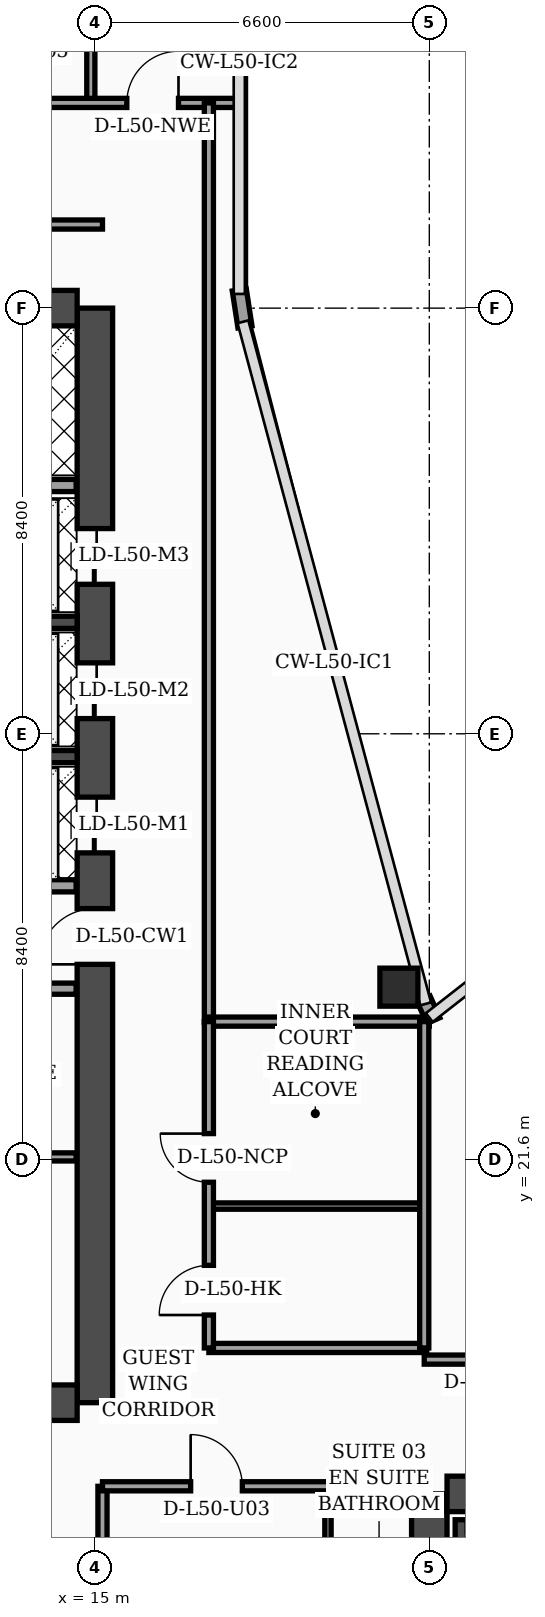
"""IFC4 building model, lengths in metres.
Left out: names, types, materials, properties, quantities, classifications, styles, units other than length and angle.
Written with IfcOpenShell. Run it as: python <this file> out.ifc"""

import sys

from ifc_helpers import new_model, si_unit, direction, frame, frame_2d, origin, origin_2d, place, context, subcontext, project, spatial, rectangle, hollow_rectangle, extrude, element, fill, save


model = new_model("IFC4")
c1 = context("Model", 3, precision=1e-05, world=origin(), true_north=direction((0.0, 1.0)))
c2 = subcontext(c1, "Body", "Model", "MODEL_VIEW")
j1 = project(units=[si_unit("LENGTHUNIT", "METRE"), si_unit("PLANEANGLEUNIT", "RADIAN")], contexts=[c1])
p1 = place(None, origin())
s1 = spatial("IfcSite", under=j1, at=p1, CompositionType="ELEMENT")
p2 = place(p1, origin())
s2 = spatial("IfcBuilding", under=s1, at=p2, CompositionType="ELEMENT")
p3 = place(p2, frame((0.0, 0.0, 203.4)))
s3 = spatial("IfcBuildingStorey", under=s2, at=p3, CompositionType="ELEMENT", Elevation=203.4)
p4 = place(p3, frame((15.0, 16.8, 0.0), z_axis=(0.0, 0.0, 1.0), x_axis=(0.0, 1.0, 0.0)))
e1 = element("IfcWall", 1, at=p4, inside=s3, PredefinedType="SHEAR", context=c2, shape_type="SweptSolid", body=[
    extrude(rectangle(XDim=21.6, YDim=0.7, at=frame_2d((10.8, 0.0))), origin(), (0.0, 0.0, 1.0), 3.56),
])
p5 = place(p4, frame((8.65, 0.0, 0.0)))
e2 = element("IfcOpeningElement", 2, at=p5, cuts=e1, PredefinedType="OPENING", context=c2, shape_type="SweptSolid", body=[
    extrude(rectangle(XDim=1.1, YDim=2.2, at=frame_2d((0.55, 1.1))), frame((0.0, 0.36, 0.0), z_axis=(0.0, -1.0, 0.0), x_axis=(1.0, 0.0, 0.0)), (0.0, 0.0, 1.0), 0.72),
])
p6 = place(p4, frame((10.85, 0.0, 0.0)))
e3 = element("IfcOpeningElement", 3, at=p6, cuts=e1, PredefinedType="OPENING", context=c2, shape_type="SweptSolid", body=[
    extrude(rectangle(XDim=1.1, YDim=2.2, at=frame_2d((0.55, 1.1))), frame((0.0, 0.36, 0.0), z_axis=(0.0, -1.0, 0.0), x_axis=(1.0, 0.0, 0.0)), (0.0, 0.0, 1.0), 0.72),
])
p7 = place(p4, frame((13.5, 0.0, 0.0)))
e4 = element("IfcOpeningElement", 4, at=p7, cuts=e1, PredefinedType="OPENING", context=c2, shape_type="SweptSolid", body=[
    extrude(rectangle(XDim=1.1, YDim=2.2, at=frame_2d((0.55, 1.1))), frame((0.0, 0.36, 0.0), z_axis=(0.0, -1.0, 0.0), x_axis=(1.0, 0.0, 0.0)), (0.0, 0.0, 1.0), 0.72),
])
p8 = place(p4, frame((16.15, 0.0, 0.0)))
e5 = element("IfcOpeningElement", 5, at=p8, cuts=e1, PredefinedType="OPENING", context=c2, shape_type="SweptSolid", body=[
    extrude(rectangle(XDim=1.1, YDim=2.2, at=frame_2d((0.55, 1.1))), frame((0.0, 0.36, 0.0), z_axis=(0.0, -1.0, 0.0), x_axis=(1.0, 0.0, 0.0)), (0.0, 0.0, 1.0), 0.72),
])
for number, where, z_axis, x_axis in (
    (6, (4.55, 38.4, 0.0), (0.0, 0.0, 1.0), (1.0, 0.0, 0.0)),
    (7, (4.55, 16.8, 0.0), (0.0, 0.0, 1.0), (1.0, 0.0, 0.0)),
):
    element("IfcWall", number, at=place(p3, frame(where, z_axis=z_axis, x_axis=x_axis)), inside=s3, PredefinedType="SHEAR", context=c2, shape_type="SweptSolid", body=[
        extrude(rectangle(XDim=10.1, YDim=0.7, at=frame_2d((5.05, 0.0))), origin(), (0.0, 0.0, 1.0), 3.56),
    ])
p9 = place(p3, frame((21.6, 4.6, 0.0), z_axis=(0.0, 0.0, 1.0), x_axis=(0.0, 1.0, 0.0)))
e8 = element("IfcWall", 8, at=p9, inside=s3, PredefinedType="SHEAR", context=c2, shape_type="SweptSolid", body=[
    extrude(rectangle(XDim=10.4, YDim=0.7, at=frame_2d((5.2, 0.0))), origin(), (0.0, 0.0, 1.0), 3.56),
])
p10 = place(p3, frame((21.95, 15.0, 0.0), z_axis=(0.0, 0.0, 1.0), x_axis=(1.0, 0.0, 0.0)))
e9 = element("IfcWall", 9, at=p10, inside=s3, PredefinedType="SHEAR", context=c2, shape_type="SweptSolid", body=[
    extrude(rectangle(XDim=10.1, YDim=0.7, at=frame_2d((5.05, 0.0))), origin(), (0.0, 0.0, 1.0), 3.56),
])
p11 = place(p10, frame((4.95, 0.0, 0.0)))
e10 = element("IfcOpeningElement", 10, at=p11, cuts=e9, PredefinedType="OPENING", context=c2, shape_type="SweptSolid", body=[
    extrude(rectangle(XDim=1.1, YDim=2.2, at=frame_2d((0.55, 1.1))), frame((0.0, 0.36, 0.0), z_axis=(0.0, -1.0, 0.0), x_axis=(1.0, 0.0, 0.0)), (0.0, 0.0, 1.0), 0.72),
])
p12 = place(p3, frame((22.23, 4.95, 0.0), z_axis=(0.0, 0.0, 1.0), x_axis=(0.0, 1.0, 0.0)))
e11 = element("IfcWall", 11, at=p12, inside=s3, PredefinedType="SOLIDWALL", context=c2, shape_type="SweptSolid", body=[
    extrude(rectangle(XDim=9.54, YDim=0.24, at=frame_2d((4.77, 0.0))), origin(), (0.0, 0.0, 1.0), 3.56),
])
for number, where, z_axis, x_axis in (
    (12, (12.18, 29.55, 0.0), (0.0, 0.0, 1.0), (1.0, 0.0, 0.0)),
    (13, (12.18, 32.2, 0.0), (0.0, 0.0, 1.0), (1.0, 0.0, 0.0)),
):
    element("IfcWall", number, at=place(p3, frame(where, z_axis=z_axis, x_axis=x_axis)), inside=s3, PredefinedType="SOLIDWALL", context=c2, shape_type="SweptSolid", body=[
        extrude(rectangle(XDim=2.47, YDim=0.24, at=frame_2d((1.235, 0.0))), origin(), (0.0, 0.0, 1.0), 3.56),
    ])
p13 = place(p3, frame((21.0, 25.0, 0.0), z_axis=(0.0, 0.0, 1.0), x_axis=(1.0, 0.0, 0.0)))
e14 = element("IfcColumn", 14, at=p13, inside=s3, PredefinedType="COLUMN", context=c2, shape_type="SweptSolid", body=[
    extrude(hollow_rectangle(XDim=0.75, YDim=0.75, WallThickness=0.032, at=origin_2d()), origin(), (0.0, 0.0, 1.0), 3.56),
])
p14 = place(p3, frame((21.68, 24.34, 0.0), z_axis=(0.0, 0.0, 1.0), x_axis=(-0.40758134973, 0.913168901875, 0.0)))
e15 = element("IfcWall", 15, at=p14, inside=s3, PredefinedType="SOLIDWALL", context=c2, shape_type="SweptSolid", body=[
    extrude(rectangle(XDim=0.471, YDim=0.28, at=frame_2d((0.235, 0.0))), origin(), (0.0, 0.0, 1.0), 3.56),
])
p15 = place(p3, frame((17.962, 38.03, 0.0), z_axis=(0.0, 0.0, 1.0), x_axis=(-0.15141125477, 0.988470855377, 0.0)))
e16 = element("IfcWall", 16, at=p15, inside=s3, PredefinedType="SOLIDWALL", context=c2, shape_type="SweptSolid", body=[
    extrude(rectangle(XDim=0.739, YDim=0.28, at=frame_2d((0.369, 0.0))), origin(), (0.0, 0.0, 1.0), 3.56),
])
p16 = place(p3, frame((9.68, 21.65, 0.0), z_axis=(0.0, 0.0, 1.0), x_axis=(1.0, 0.0, 0.0)))
e17 = element("IfcWall", 17, at=p16, inside=s3, PredefinedType="PARTITIONING", context=c2, shape_type="SweptSolid", body=[
    extrude(rectangle(XDim=4.95, YDim=0.16, at=frame_2d((2.475, 0.0))), origin(), (0.0, 0.0, 1.0), 3.09),
])
p17 = place(p16, frame((1.1, 0.0, 0.0)))
e18 = element("IfcOpeningElement", 18, at=p17, cuts=e17, PredefinedType="OPENING", context=c2, shape_type="SweptSolid", body=[
    extrude(rectangle(XDim=0.98, YDim=2.15, at=frame_2d((0.49, 1.075))), frame((0.0, 0.09, 0.0), z_axis=(0.0, -1.0, 0.0), x_axis=(1.0, 0.0, 0.0)), (0.0, 0.0, 1.0), 0.18),
])
p18 = place(p3, frame((9.68, 24.97, 0.0), z_axis=(0.0, 0.0, 1.0), x_axis=(1.0, 0.0, 0.0)))
e19 = element("IfcWall", 19, at=p18, inside=s3, PredefinedType="SOLIDWALL", context=c2, shape_type="SweptSolid", body=[
    extrude(rectangle(XDim=4.95, YDim=0.22, at=frame_2d((2.475, 0.0))), origin(), (0.0, 0.0, 1.0), 2.94),
])
p19 = place(p18, frame((0.9, 0.0, 0.0)))
e20 = element("IfcOpeningElement", 20, at=p19, cuts=e19, PredefinedType="OPENING", context=c2, shape_type="SweptSolid", body=[
    extrude(rectangle(XDim=0.98, YDim=2.15, at=frame_2d((0.49, 1.075))), frame((0.0, 0.12, 0.0), z_axis=(0.0, -1.0, 0.0), x_axis=(1.0, 0.0, 0.0)), (0.0, 0.0, 1.0), 0.24),
])
p20 = place(p3, frame((12.25, 27.0, 0.0), z_axis=(0.0, 0.0, 1.0), x_axis=(1.0, 0.0, 0.0)))
e21 = element("IfcWall", 21, at=p20, inside=s3, PredefinedType="SOLIDWALL", context=c2, shape_type="SweptSolid", body=[
    extrude(rectangle(XDim=2.38, YDim=0.24, at=frame_2d((1.19, 0.0))), origin(), (0.0, 0.0, 1.0), 3.56),
])
p21 = place(p3, frame((9.66, 34.9, 0.0), z_axis=(0.0, 0.0, 1.0), x_axis=(1.0, 0.0, 0.0)))
e22 = element("IfcWall", 22, at=p21, inside=s3, PredefinedType="SOLIDWALL", context=c2, shape_type="SweptSolid", body=[
    extrude(rectangle(XDim=4.97, YDim=0.24, at=frame_2d((2.485, 0.0))), origin(), (0.0, 0.0, 1.0), 3.56),
])
p22 = place(p3, frame((15.15, 2.44, 0.0), z_axis=(0.0, 0.0, 1.0), x_axis=(0.0, 1.0, 0.0)))
e23 = element("IfcWall", 23, at=p22, inside=s3, PredefinedType="PARTITIONING", context=c2, shape_type="SweptSolid", body=[
    extrude(rectangle(XDim=12.71, YDim=0.18, at=frame_2d((6.355, 0.0))), origin(), (0.0, 0.0, 1.0), 3.09),
])
p23 = place(p3, frame((19.6, 2.44, 0.0), z_axis=(0.0, 0.0, 1.0), x_axis=(0.0, 1.0, 0.0)))
e24 = element("IfcWall", 24, at=p23, inside=s3, PredefinedType="PARTITIONING", context=c2, shape_type="SweptSolid", body=[
    extrude(rectangle(XDim=12.71, YDim=0.125, at=frame_2d((6.355, 0.0))), origin(), (0.0, 0.0, 1.0), 2.59),
])
p24 = place(p23, frame((4.34, 0.0, 0.0)))
e25 = element("IfcOpeningElement", 25, at=p24, cuts=e24, PredefinedType="OPENING", context=c2, shape_type="SweptSolid", body=[
    extrude(rectangle(XDim=0.96, YDim=2.2, at=frame_2d((0.48, 1.1))), frame((0.0, 0.073, 0.0), z_axis=(0.0, -1.0, 0.0), x_axis=(1.0, 0.0, 0.0)), (0.0, 0.0, 1.0), 0.145),
])
p25 = place(p23, frame((10.18, 0.0, 0.0)))
e26 = element("IfcOpeningElement", 26, at=p25, cuts=e24, PredefinedType="OPENING", context=c2, shape_type="SweptSolid", body=[
    extrude(rectangle(XDim=0.9, YDim=2.15, at=frame_2d((0.45, 1.075))), frame((0.0, 0.073, 0.0), z_axis=(0.0, -1.0, 0.0), x_axis=(1.0, 0.0, 0.0)), (0.0, 0.0, 1.0), 0.145),
])
p26 = place(p3, frame((15.15, 15.15, 0.0), z_axis=(0.0, 0.0, 1.0), x_axis=(1.0, 0.0, 0.0)))
e27 = element("IfcWall", 27, at=p26, inside=s3, PredefinedType="PARTITIONING", context=c2, shape_type="SweptSolid", body=[
    extrude(rectangle(XDim=6.45, YDim=0.18, at=frame_2d((3.225, 0.0))), origin(), (0.0, 0.0, 1.0), 2.59),
])
p27 = place(p26, frame((1.74, 0.0, 0.0)))
e28 = element("IfcOpeningElement", 28, at=p27, cuts=e27, PredefinedType="OPENING", context=c2, shape_type="SweptSolid", body=[
    extrude(rectangle(XDim=1.02, YDim=2.2, at=frame_2d((0.51, 1.1))), frame((0.0, 0.1, 0.0), z_axis=(0.0, -1.0, 0.0), x_axis=(1.0, 0.0, 0.0)), (0.0, 0.0, 1.0), 0.2),
])
p28 = place(p3, frame((14.92, 42.45, 0.0), z_axis=(0.0, 0.0, 1.0), x_axis=(0.0, 1.0, 0.0)))
e29 = element("IfcWall", 29, at=p28, inside=s3, PredefinedType="PARTITIONING", context=c2, shape_type="SweptSolid", body=[
    extrude(rectangle(XDim=5.35, YDim=0.16, at=frame_2d((2.675, 0.0))), origin(), (0.0, 0.0, 1.0), 3.09),
])
p29 = place(p3, frame((0.08, 42.45, 0.0), z_axis=(0.0, 0.0, 1.0), x_axis=(1.0, 0.0, 0.0)))
e30 = element("IfcWall", 30, at=p29, inside=s3, PredefinedType="PARTITIONING", context=c2, shape_type="SweptSolid", body=[
    extrude(rectangle(XDim=17.77, YDim=0.18, at=frame_2d((8.885, 0.0))), origin(), (0.0, 0.0, 1.0), 2.94),
])
p30 = place(p29, frame((0.9, 0.0, 0.0)))
e31 = element("IfcOpeningElement", 31, at=p30, cuts=e30, PredefinedType="OPENING", context=c2, shape_type="SweptSolid", body=[
    extrude(rectangle(XDim=1.02, YDim=2.2, at=frame_2d((0.51, 1.1))), frame((0.0, 0.1, 0.0), z_axis=(0.0, -1.0, 0.0), x_axis=(1.0, 0.0, 0.0)), (0.0, 0.0, 1.0), 0.2),
])
p31 = place(p29, frame((4.2, 0.0, 0.0)))
e32 = element("IfcOpeningElement", 32, at=p31, cuts=e30, PredefinedType="OPENING", context=c2, shape_type="SweptSolid", body=[
    extrude(rectangle(XDim=1.02, YDim=2.2, at=frame_2d((0.51, 1.1))), frame((0.0, 0.1, 0.0), z_axis=(0.0, -1.0, 0.0), x_axis=(1.0, 0.0, 0.0)), (0.0, 0.0, 1.0), 0.2),
])
p32 = place(p29, frame((10.08, 0.0, 0.0)))
e33 = element("IfcOpeningElement", 33, at=p32, cuts=e30, PredefinedType="OPENING", context=c2, shape_type="SweptSolid", body=[
    extrude(rectangle(XDim=1.02, YDim=2.2, at=frame_2d((0.51, 1.1))), frame((0.0, 0.1, 0.0), z_axis=(0.0, -1.0, 0.0), x_axis=(1.0, 0.0, 0.0)), (0.0, 0.0, 1.0), 0.2),
])
p33 = place(p29, frame((15.55, 0.0, 0.0)))
e34 = element("IfcOpeningElement", 34, at=p33, cuts=e30, PredefinedType="OPENING", context=c2, shape_type="SweptSolid", body=[
    extrude(rectangle(XDim=1.02, YDim=2.2, at=frame_2d((0.51, 1.1))), frame((0.0, 0.1, 0.0), z_axis=(0.0, -1.0, 0.0), x_axis=(1.0, 0.0, 0.0)), (0.0, 0.0, 1.0), 0.2),
])
p34 = place(p3, frame((17.25, 24.3, 0.0), z_axis=(0.0, 0.0, 1.0), x_axis=(0.0, 1.0, 0.0)))
e35 = element("IfcWall", 35, at=p34, inside=s3, PredefinedType="PARTITIONING", context=c2, shape_type="SweptSolid", body=[
    extrude(rectangle(XDim=18.15, YDim=0.18, at=frame_2d((9.075, 0.0))), origin(), (0.0, 0.0, 1.0), 2.94),
])
p35 = place(p3, frame((3.83, 40.05, 0.0), z_axis=(0.0, 0.0, 1.0), x_axis=(1.0, 0.0, 0.0)))
e36 = element("IfcWall", 36, at=p35, inside=s3, PredefinedType="PARTITIONING", context=c2, shape_type="SweptSolid", body=[
    extrude(rectangle(XDim=11.32, YDim=0.18, at=frame_2d((5.66, 0.0))), origin(), (0.0, 0.0, 1.0), 2.94),
])
p36 = place(p3, frame((17.25, 17.88, 0.0), z_axis=(0.0, 0.0, 1.0), x_axis=(1.0, 0.0, 0.0)))
e37 = element("IfcWall", 37, at=p36, inside=s3, PredefinedType="PARTITIONING", context=c2, shape_type="SweptSolid", body=[
    extrude(rectangle(XDim=4.3, YDim=0.18, at=frame_2d((2.15, 0.0))), origin(), (0.0, 0.0, 1.0), 3.56),
])
p37 = place(p3, frame((17.25, 20.68, 0.0), z_axis=(0.0, 0.0, 1.0), x_axis=(1.0, 0.0, 0.0)))
e38 = element("IfcWall", 38, at=p37, inside=s3, PredefinedType="PARTITIONING", context=c2, shape_type="SweptSolid", body=[
    extrude(rectangle(XDim=4.3, YDim=0.125, at=frame_2d((2.15, 0.0))), origin(), (0.0, 0.0, 1.0), 3.56),
])
p38 = place(p3, frame((17.25, 24.32, 0.0), z_axis=(0.0, 0.0, 1.0), x_axis=(1.0, 0.0, 0.0)))
e39 = element("IfcWall", 39, at=p38, inside=s3, PredefinedType="PARTITIONING", context=c2, shape_type="SweptSolid", body=[
    extrude(rectangle(XDim=4.35, YDim=0.18, at=frame_2d((2.175, 0.0))), origin(), (0.0, 0.0, 1.0), 3.56),
])
p39 = place(p3, frame((21.5, 17.88, 0.0), z_axis=(0.0, 0.0, 1.0), x_axis=(0.0, 1.0, 0.0)))
e40 = element("IfcWall", 40, at=p39, inside=s3, PredefinedType="PARTITIONING", context=c2, shape_type="SweptSolid", body=[
    extrude(rectangle(XDim=6.44, YDim=0.18, at=frame_2d((3.22, 0.0))), origin(), (0.0, 0.0, 1.0), 3.09),
])
p40 = place(p3, frame((17.25, 17.88, 0.0), z_axis=(0.0, 0.0, 1.0), x_axis=(0.0, 1.0, 0.0)))
e41 = element("IfcWall", 41, at=p40, inside=s3, PredefinedType="PARTITIONING", context=c2, shape_type="SweptSolid", body=[
    extrude(rectangle(XDim=6.44, YDim=0.18, at=frame_2d((3.22, 0.0))), origin(), (0.0, 0.0, 1.0), 3.09),
])
p41 = place(p40, frame((0.65, 0.0, 0.0)))
e42 = element("IfcOpeningElement", 42, at=p41, cuts=e41, PredefinedType="OPENING", context=c2, shape_type="SweptSolid", body=[
    extrude(rectangle(XDim=0.98, YDim=2.15, at=frame_2d((0.49, 1.075))), frame((0.0, 0.1, 0.0), z_axis=(0.0, -1.0, 0.0), x_axis=(1.0, 0.0, 0.0)), (0.0, 0.0, 1.0), 0.2),
])
p42 = place(p40, frame((3.27, 0.0, 0.0)))
e43 = element("IfcOpeningElement", 43, at=p42, cuts=e41, PredefinedType="OPENING", context=c2, shape_type="SweptSolid", body=[
    extrude(rectangle(XDim=0.96, YDim=2.2, at=frame_2d((0.48, 1.1))), frame((0.0, 0.1, 0.0), z_axis=(0.0, -1.0, 0.0), x_axis=(1.0, 0.0, 0.0)), (0.0, 0.0, 1.0), 0.2),
])
p43 = place(p3, frame((21.5, 17.65, 0.0), z_axis=(0.0, 0.0, 1.0), x_axis=(1.0, 0.0, 0.0)))
e44 = element("IfcWall", 44, at=p43, inside=s3, PredefinedType="PARTITIONING", context=c2, shape_type="SweptSolid", body=[
    extrude(rectangle(XDim=17.25, YDim=0.18, at=frame_2d((8.625, 0.0))), origin(), (0.0, 0.0, 1.0), 2.94),
])
p44 = place(p43, frame((0.95, 0.0, 0.0)))
e45 = element("IfcOpeningElement", 45, at=p44, cuts=e44, PredefinedType="OPENING", context=c2, shape_type="SweptSolid", body=[
    extrude(rectangle(XDim=1.02, YDim=2.2, at=frame_2d((0.51, 1.1))), frame((0.0, 0.1, 0.0), z_axis=(0.0, -1.0, 0.0), x_axis=(1.0, 0.0, 0.0)), (0.0, 0.0, 1.0), 0.2),
])
p45 = place(p43, frame((6.67, 0.0, 0.0)))
e46 = element("IfcOpeningElement", 46, at=p45, cuts=e44, PredefinedType="OPENING", context=c2, shape_type="SweptSolid", body=[
    extrude(rectangle(XDim=1.02, YDim=2.2, at=frame_2d((0.51, 1.1))), frame((0.0, 0.1, 0.0), z_axis=(0.0, -1.0, 0.0), x_axis=(1.0, 0.0, 0.0)), (0.0, 0.0, 1.0), 0.2),
])
p46 = place(p43, frame((12.38, 0.0, 0.0)))
e47 = element("IfcOpeningElement", 47, at=p46, cuts=e44, PredefinedType="OPENING", context=c2, shape_type="SweptSolid", body=[
    extrude(rectangle(XDim=1.02, YDim=2.2, at=frame_2d((0.51, 1.1))), frame((0.0, 0.1, 0.0), z_axis=(0.0, -1.0, 0.0), x_axis=(1.0, 0.0, 0.0)), (0.0, 0.0, 1.0), 0.2),
])
p47 = place(p27, origin())
e48 = element("IfcDoor", 48, at=p47, inside=s3, OperationType="SINGLE_SWING_LEFT", PredefinedType="DOOR", context=c2, shape_type="SweptSolid", body=[
    extrude(rectangle(XDim=1.02, YDim=2.2, at=frame_2d((0.51, 1.1))), frame((0.0, 0.025, 0.0), z_axis=(0.0, -1.0, 0.0), x_axis=(1.0, 0.0, 0.0)), (0.0, 0.0, 1.0), 0.05),
])
fill(e28, e48)
p48 = place(p33, origin())
e49 = element("IfcDoor", 49, at=p48, inside=s3, OperationType="SINGLE_SWING_RIGHT", PredefinedType="DOOR", context=c2, shape_type="SweptSolid", body=[
    extrude(rectangle(XDim=1.02, YDim=2.2, at=frame_2d((0.51, 1.1))), frame((0.0, 0.025, 0.0), z_axis=(0.0, -1.0, 0.0), x_axis=(1.0, 0.0, 0.0)), (0.0, 0.0, 1.0), 0.05),
])
fill(e34, e49)
p49 = place(p41, origin())
e50 = element("IfcDoor", 50, at=p49, inside=s3, OperationType="SINGLE_SWING_LEFT", PredefinedType="DOOR", context=c2, shape_type="SweptSolid", body=[
    extrude(rectangle(XDim=0.98, YDim=2.15, at=frame_2d((0.49, 1.075))), frame((0.0, 0.025, 0.0), z_axis=(0.0, -1.0, 0.0), x_axis=(1.0, 0.0, 0.0)), (0.0, 0.0, 1.0), 0.05),
])
fill(e42, e50)
p50 = place(p42, origin())
e51 = element("IfcDoor", 51, at=p50, inside=s3, OperationType="SINGLE_SWING_RIGHT", PredefinedType="DOOR", context=c2, shape_type="SweptSolid", body=[
    extrude(rectangle(XDim=0.96, YDim=2.2, at=frame_2d((0.48, 1.1))), frame((0.0, 0.025, 0.0), z_axis=(0.0, -1.0, 0.0), x_axis=(1.0, 0.0, 0.0)), (0.0, 0.0, 1.0), 0.05),
])
fill(e43, e51)
p51 = place(p5, origin())
e52 = element("IfcDoor", 52, at=p51, inside=s3, OperationType="SINGLE_SWING_LEFT", PredefinedType="DOOR", context=c2, shape_type="SweptSolid", body=[
    extrude(rectangle(XDim=1.1, YDim=2.2, at=frame_2d((0.55, 1.1))), frame((0.0, 0.025, 0.0), z_axis=(0.0, -1.0, 0.0), x_axis=(1.0, 0.0, 0.0)), (0.0, 0.0, 1.0), 0.05),
])
fill(e2, e52)
p52 = place(p6, origin())
e53 = element("IfcDoor", 53, at=p52, inside=s3, OperationType="DOUBLE_DOOR_SLIDING", PredefinedType="DOOR", context=c2, shape_type="SweptSolid", body=[
    extrude(rectangle(XDim=1.1, YDim=2.2, at=frame_2d((0.55, 1.1))), frame((0.0, 0.025, 0.0), z_axis=(0.0, -1.0, 0.0), x_axis=(1.0, 0.0, 0.0)), (0.0, 0.0, 1.0), 0.05),
])
fill(e3, e53)
p53 = place(p7, origin())
e54 = element("IfcDoor", 54, at=p53, inside=s3, OperationType="DOUBLE_DOOR_SLIDING", PredefinedType="DOOR", context=c2, shape_type="SweptSolid", body=[
    extrude(rectangle(XDim=1.1, YDim=2.2, at=frame_2d((0.55, 1.1))), frame((0.0, 0.025, 0.0), z_axis=(0.0, -1.0, 0.0), x_axis=(1.0, 0.0, 0.0)), (0.0, 0.0, 1.0), 0.05),
])
fill(e4, e54)
p54 = place(p8, origin())
e55 = element("IfcDoor", 55, at=p54, inside=s3, OperationType="DOUBLE_DOOR_SLIDING", PredefinedType="DOOR", context=c2, shape_type="SweptSolid", body=[
    extrude(rectangle(XDim=1.1, YDim=2.2, at=frame_2d((0.55, 1.1))), frame((0.0, 0.025, 0.0), z_axis=(0.0, -1.0, 0.0), x_axis=(1.0, 0.0, 0.0)), (0.0, 0.0, 1.0), 0.05),
])
fill(e5, e55)
save(model, sys.argv[1])
